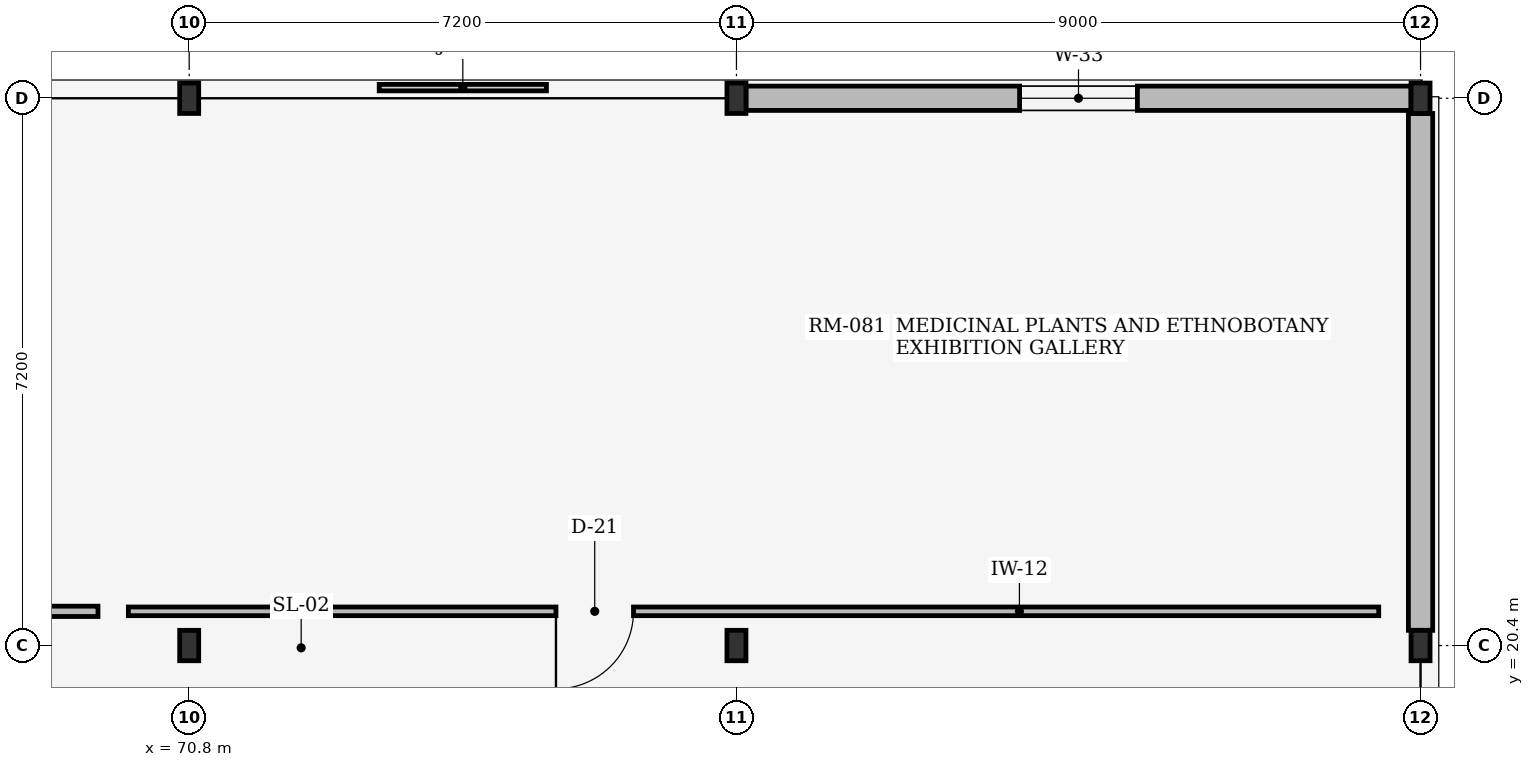
"""IFC4 building model, lengths in metres.
Left out: names, types, materials, properties, quantities, classifications, styles, units other than length and angle.
Written with IfcOpenShell. Run it as: python <this file> out.ifc"""

import sys

from ifc_helpers import new_model, si_unit, direction, frame, frame_2d, origin, origin_2d, place, context, subcontext, project, spatial, rectangle, i_section, extrude, element, fill, save


model = new_model("IFC4")
c1 = context("Model", 3, precision=1e-05, world=origin(), true_north=direction((0.0, 1.0)))
c2 = subcontext(c1, "Body", "Model", "MODEL_VIEW")
j1 = project(units=[si_unit("LENGTHUNIT", "METRE"), si_unit("PLANEANGLEUNIT", "RADIAN")], contexts=[c1])
p1 = place(None, origin())
s1 = spatial("IfcSite", under=j1, at=p1, CompositionType="ELEMENT")
p2 = place(p1, origin())
s2 = spatial("IfcBuilding", under=s1, at=p2, CompositionType="ELEMENT")
p3 = place(p2, frame((0.0, 0.0, 4.8)))
s3 = spatial("IfcBuildingStorey", under=s2, at=p3, CompositionType="ELEMENT", Elevation=4.8)
for number, where, z_axis, x_axis in (
    (1, (70.8, 20.4, 0.0), (0.0, 0.0, 1.0), (1.0, 0.0, 0.0)),
    (2, (70.8, 27.6, 0.0), (0.0, 0.0, 1.0), (1.0, 0.0, 0.0)),
    (3, (78.0, 20.4, 0.0), (0.0, 0.0, 1.0), (1.0, 0.0, 0.0)),
    (4, (78.0, 27.6, 0.0), (0.0, 0.0, 1.0), (1.0, 0.0, 0.0)),
    (5, (87.0, 20.4, 0.0), (0.0, 0.0, 1.0), (1.0, 0.0, 0.0)),
    (6, (87.0, 27.6, 0.0), (0.0, 0.0, 1.0), (1.0, 0.0, 0.0)),
):
    element("IfcColumn", number, at=place(p3, frame(where, z_axis=z_axis, x_axis=x_axis)), inside=s3, PredefinedType="COLUMN", context=c2, shape_type="SweptSolid", body=[
        extrude(i_section(OverallWidth=0.25, OverallDepth=0.4, WebThickness=0.01, FlangeThickness=0.013, at=origin_2d()), origin(), (0.0, 0.0, 1.0), 3.95),
    ])
p4 = place(p3, frame((78.125, 27.6, 0.0), z_axis=(0.0, 0.0, 1.0), x_axis=(1.0, 0.0, 0.0)))
e7 = element("IfcWall", 7, at=p4, inside=s3, PredefinedType="STANDARD", context=c2, shape_type="SweptSolid", body=[
    extrude(rectangle(XDim=8.75, YDim=0.32, at=frame_2d((4.375, 0.0))), origin(), (0.0, 0.0, 1.0), 3.41),
])
p5 = place(p4, frame((3.6, 0.0, 0.75)))
e8 = element("IfcOpeningElement", 8, at=p5, cuts=e7, PredefinedType="OPENING", context=c2, shape_type="SweptSolid", body=[
    extrude(rectangle(XDim=1.55, YDim=1.35, at=frame_2d((0.775, 0.675))), frame((0.0, 0.17, 0.0), z_axis=(0.0, -1.0, 0.0), x_axis=(1.0, 0.0, 0.0)), (0.0, 0.0, 1.0), 0.34),
])
p6 = place(p3, frame((87.0, 20.6, 0.0), z_axis=(0.0, 0.0, 1.0), x_axis=(0.0, 1.0, 0.0)))
e9 = element("IfcWall", 9, at=p6, inside=s3, PredefinedType="STANDARD", context=c2, shape_type="SweptSolid", body=[
    extrude(rectangle(XDim=6.8, YDim=0.32, at=frame_2d((3.4, 0.0))), origin(), (0.0, 0.0, 1.0), 3.41),
])
p7 = place(p3, frame((70.0, 20.85, 0.0), z_axis=(0.0, 0.0, 1.0), x_axis=(1.0, 0.0, 0.0)))
e10 = element("IfcWall", 10, at=p7, inside=s3, PredefinedType="PARTITIONING", context=c2, shape_type="SweptSolid", body=[
    extrude(rectangle(XDim=16.45, YDim=0.114, at=frame_2d((8.225, 0.0))), origin(), (0.0, 0.0, 1.0), 3.93),
])
p8 = place(p7, frame((5.625, 0.0, 0.0)))
e11 = element("IfcOpeningElement", 11, at=p8, cuts=e10, PredefinedType="OPENING", context=c2, shape_type="SweptSolid", body=[
    extrude(rectangle(XDim=1.02, YDim=2.18, at=frame_2d((0.51, 1.09))), frame((0.0, 0.067, 0.0), z_axis=(0.0, -1.0, 0.0), x_axis=(1.0, 0.0, 0.0)), (0.0, 0.0, 1.0), 0.134),
])
p9 = place(p3, frame((60.8, 20.85, 0.0), z_axis=(0.0, 0.0, 1.0), x_axis=(1.0, 0.0, 0.0)))
e12 = element("IfcWall", 12, at=p9, inside=s3, PredefinedType="PARTITIONING", context=c2, shape_type="SweptSolid", body=[
    extrude(rectangle(XDim=8.8, YDim=0.136, at=frame_2d((4.4, 0.0))), origin(), (0.0, 0.0, 1.0), 3.93),
])
p10 = place(p9, frame((3.79, 0.0, 0.0)))
e13 = element("IfcOpeningElement", 13, at=p10, cuts=e12, PredefinedType="OPENING", context=c2, shape_type="SweptSolid", body=[
    extrude(rectangle(XDim=1.22, YDim=2.22, at=frame_2d((0.61, 1.11))), frame((0.0, 0.078, 0.0), z_axis=(0.0, -1.0, 0.0), x_axis=(1.0, 0.0, 0.0)), (0.0, 0.0, 1.0), 0.156),
])
p11 = place(p5, origin())
e14 = element("IfcWindow", 14, at=p11, inside=s3, PartitioningType="SINGLE_PANEL", PredefinedType="WINDOW", context=c2, shape_type="SweptSolid", body=[
    extrude(rectangle(XDim=1.55, YDim=1.35, at=frame_2d((0.775, 0.675))), frame((0.0, 0.03, 0.0), z_axis=(0.0, -1.0, 0.0), x_axis=(1.0, 0.0, 0.0)), (0.0, 0.0, 1.0), 0.06),
])
fill(e8, e14)
p12 = place(p8, frame((1.02, 0.0, 0.0), z_axis=(0.0, 0.0, 1.0), x_axis=(-1.0, 0.0, 0.0)))
e15 = element("IfcDoor", 15, at=p12, inside=s3, OperationType="SINGLE_SWING_LEFT", PredefinedType="DOOR", context=c2, shape_type="SweptSolid", body=[
    extrude(rectangle(XDim=1.02, YDim=2.18, at=frame_2d((0.51, 1.09))), frame((0.0, 0.025, 0.0), z_axis=(0.0, -1.0, 0.0), x_axis=(1.0, 0.0, 0.0)), (0.0, 0.0, 1.0), 0.05),
])
fill(e11, e15)
save(model, sys.argv[1])
